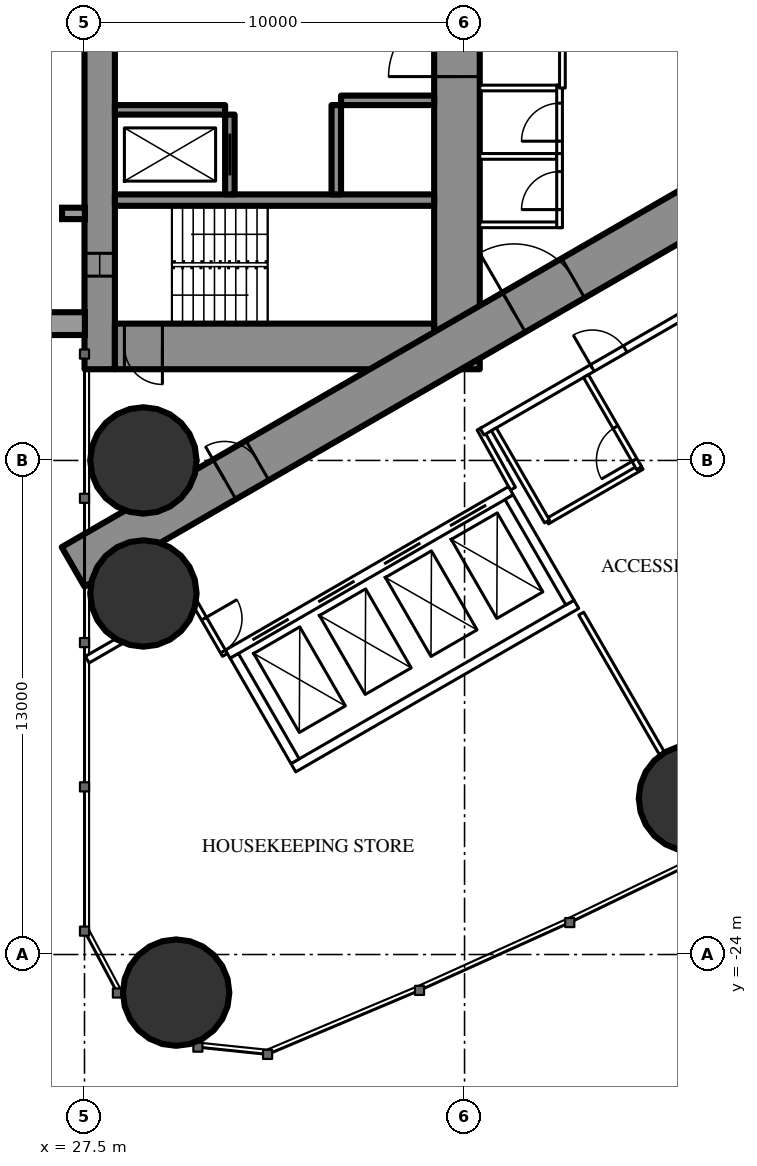
"""IFC4 building model, lengths in metres.
Left out: names, types, materials, properties, quantities, classifications, styles, units other than length and angle.
Written with IfcOpenShell. Run it as: python <this file> out.ifc"""

import sys

from ifc_helpers import new_model, si_unit, direction, frame, frame_2d, origin, origin_2d, place, context, subcontext, project, spatial, rectangle, hollow_circle, extrude, element, fill, save


model = new_model("IFC4")
c1 = context("Model", 3, precision=1e-05, world=origin(), true_north=direction((0.0, 1.0)))
c2 = subcontext(c1, "Body", "Model", "MODEL_VIEW")
j1 = project(units=[si_unit("LENGTHUNIT", "METRE"), si_unit("PLANEANGLEUNIT", "RADIAN")], contexts=[c1])
p1 = place(None, origin())
s1 = spatial("IfcSite", under=j1, at=p1, CompositionType="ELEMENT")
p2 = place(p1, origin())
s2 = spatial("IfcBuilding", under=s1, at=p2, CompositionType="ELEMENT")
p3 = place(p2, frame((0.0, 0.0, 21.5)))
s3 = spatial("IfcBuildingStorey", under=s2, at=p3, CompositionType="ELEMENT", Elevation=21.5)
for number, where, z_axis, x_axis in (
    (1, (29.911, -25.002, 0.0), (0.0, 0.0, 1.0), (1.0, 0.0, 0.0)),
    (2, (29.05, -11.0, 0.0), (0.0, 0.0, 1.0), (1.0, 0.0, 0.0)),
    (3, (29.05, -14.5, 0.0), (0.0, 0.0, 1.0), (1.0, 0.0, 0.0)),
    (4, (43.484, -19.886, 0.0), (0.0, 0.0, 1.0), (1.0, 0.0, 0.0)),
):
    element("IfcColumn", number, at=place(p3, frame(where, z_axis=z_axis, x_axis=x_axis)), inside=s3, PredefinedType="COLUMN", context=c2, shape_type="SweptSolid", body=[
        extrude(hollow_circle(Radius=1.4, WallThickness=0.12, at=origin_2d()), origin(), (0.0, 0.0, 1.0), 3.5),
    ])
p4 = place(p3, frame((27.9, -8.6, 0.0), z_axis=(0.0, 0.0, 1.0), x_axis=(0.0, 1.0, 0.0)))
e5 = element("IfcWall", 5, at=p4, inside=s3, PredefinedType="SHEAR", context=c2, shape_type="SweptSolid", body=[
    extrude(rectangle(XDim=17.2, YDim=0.8, at=frame_2d((8.6, 0.0))), origin(), (0.0, 0.0, 1.0), 3.5),
])
p5 = place(p4, frame((2.45, 0.0, 0.6)))
e6 = element("IfcOpeningElement", 6, at=p5, cuts=e5, PredefinedType="OPENING", context=c2, shape_type="SweptSolid", body=[
    extrude(rectangle(XDim=0.6, YDim=2.1, at=frame_2d((0.3, 1.05))), frame((0.0, 0.41, 0.0), z_axis=(0.0, -1.0, 0.0), x_axis=(1.0, 0.0, 0.0)), (0.0, 0.0, 1.0), 0.82),
])
p6 = place(p4, frame((14.15, 0.0, 0.6)))
e7 = element("IfcOpeningElement", 7, at=p6, cuts=e5, PredefinedType="OPENING", context=c2, shape_type="SweptSolid", body=[
    extrude(rectangle(XDim=0.6, YDim=2.1, at=frame_2d((0.3, 1.05))), frame((0.0, 0.41, 0.0), z_axis=(0.0, -1.0, 0.0), x_axis=(1.0, 0.0, 0.0)), (0.0, 0.0, 1.0), 0.82),
])
p7 = place(p3, frame((37.3, -8.6, 0.0), z_axis=(0.0, 0.0, 1.0), x_axis=(0.0, 1.0, 0.0)))
e8 = element("IfcWall", 8, at=p7, inside=s3, PredefinedType="SHEAR", context=c2, shape_type="SweptSolid", body=[
    extrude(rectangle(XDim=17.2, YDim=1.2, at=frame_2d((8.6, 0.0))), origin(), (0.0, 0.0, 1.0), 3.5),
])
p8 = place(p7, frame((7.7, 0.0, 0.0)))
e9 = element("IfcOpeningElement", 9, at=p8, cuts=e8, PredefinedType="OPENING", context=c2, shape_type="SweptSolid", body=[
    extrude(rectangle(XDim=1.8, YDim=2.2, at=frame_2d((0.9, 1.1))), frame((0.0, 0.61, 0.0), z_axis=(0.0, -1.0, 0.0), x_axis=(1.0, 0.0, 0.0)), (0.0, 0.0, 1.0), 1.22),
])
p9 = place(p3, frame((28.3, -8.0, 0.0), z_axis=(0.0, 0.0, 1.0), x_axis=(1.0, 0.0, 0.0)))
e10 = element("IfcWall", 10, at=p9, inside=s3, PredefinedType="SHEAR", context=c2, shape_type="SweptSolid", body=[
    extrude(rectangle(XDim=8.4, YDim=1.2, at=frame_2d((4.2, 0.0))), origin(), (0.0, 0.0, 1.0), 3.5),
])
p10 = place(p9, frame((0.25, 0.0, 0.0)))
e11 = element("IfcOpeningElement", 11, at=p10, cuts=e10, PredefinedType="OPENING", context=c2, shape_type="SweptSolid", body=[
    extrude(rectangle(XDim=1.0, YDim=2.2, at=frame_2d((0.5, 1.1))), frame((0.0, 0.61, 0.0), z_axis=(0.0, -1.0, 0.0), x_axis=(1.0, 0.0, 0.0)), (0.0, 0.0, 1.0), 1.22),
])
p11 = place(p3, frame((28.3, -4.15, 0.0), z_axis=(0.0, 0.0, 1.0), x_axis=(1.0, 0.0, 0.0)))
e12 = element("IfcWall", 12, at=p11, inside=s3, PredefinedType="SHEAR", context=c2, shape_type="SweptSolid", body=[
    extrude(rectangle(XDim=8.4, YDim=0.3, at=frame_2d((4.2, 0.0))), origin(), (0.0, 0.0, 1.0), 3.5),
])
p12 = place(p3, frame((31.325, -4.0, 0.0), z_axis=(0.0, 0.0, 1.0), x_axis=(0.0, 1.0, 0.0)))
e13 = element("IfcWall", 13, at=p12, inside=s3, PredefinedType="SHEAR", context=c2, shape_type="SweptSolid", body=[
    extrude(rectangle(XDim=2.1, YDim=0.25, at=frame_2d((1.05, 0.0))), origin(), (0.0, 0.0, 1.0), 3.5),
])
p13 = place(p12, frame((0.5, 0.0, 0.0)))
e14 = element("IfcOpeningElement", 14, at=p13, cuts=e13, PredefinedType="OPENING", context=c2, shape_type="SweptSolid", body=[
    extrude(rectangle(XDim=1.1, YDim=2.2, at=frame_2d((0.55, 1.1))), frame((0.0, 0.135, 0.0), z_axis=(0.0, -1.0, 0.0), x_axis=(1.0, 0.0, 0.0)), (0.0, 0.0, 1.0), 0.27),
])
p14 = place(p3, frame((34.125, -4.0, 0.0), z_axis=(0.0, 0.0, 1.0), x_axis=(0.0, 1.0, 0.0)))
e15 = element("IfcWall", 15, at=p14, inside=s3, PredefinedType="SHEAR", context=c2, shape_type="SweptSolid", body=[
    extrude(rectangle(XDim=2.35, YDim=0.25, at=frame_2d((1.175, 0.0))), origin(), (0.0, 0.0, 1.0), 3.5),
])
p15 = place(p3, frame((28.3, -1.775, 0.0), z_axis=(0.0, 0.0, 1.0), x_axis=(1.0, 0.0, 0.0)))
e16 = element("IfcWall", 16, at=p15, inside=s3, PredefinedType="SHEAR", context=c2, shape_type="SweptSolid", body=[
    extrude(rectangle(XDim=2.9, YDim=0.25, at=frame_2d((1.45, 0.0))), origin(), (0.0, 0.0, 1.0), 3.5),
])
p16 = place(p3, frame((34.25, -1.525, 0.0), z_axis=(0.0, 0.0, 1.0), x_axis=(1.0, 0.0, 0.0)))
e17 = element("IfcWall", 17, at=p16, inside=s3, PredefinedType="SHEAR", context=c2, shape_type="SweptSolid", body=[
    extrude(rectangle(XDim=2.45, YDim=0.25, at=frame_2d((1.225, 0.0))), origin(), (0.0, 0.0, 1.0), 3.5),
])
p17 = place(p3, frame((27.2, -13.8, 0.0), z_axis=(0.0, 0.0, 1.0), x_axis=(0.866027159892, 0.499996958321, 0.0)))
e18 = element("IfcWall", 18, at=p17, inside=s3, PredefinedType="SHEAR", context=c2, shape_type="SweptSolid", body=[
    extrude(rectangle(XDim=27.947, YDim=1.2, at=frame_2d((13.973, 0.0))), origin(), (0.0, 0.0, 1.0), 3.5),
])
p18 = place(p17, frame((4.6, 0.0, 0.0)))
e19 = element("IfcOpeningElement", 19, at=p18, cuts=e18, PredefinedType="OPENING", context=c2, shape_type="SweptSolid", body=[
    extrude(rectangle(XDim=1.0, YDim=2.2, at=frame_2d((0.5, 1.1))), frame((0.0, 0.61, 0.0), z_axis=(0.0, -1.0, 0.0), x_axis=(1.0, 0.0, 0.0)), (0.0, 0.0, 1.0), 1.22),
])
p19 = place(p17, frame((13.395, 0.0, 0.0)))
e20 = element("IfcOpeningElement", 20, at=p19, cuts=e18, PredefinedType="OPENING", context=c2, shape_type="SweptSolid", body=[
    extrude(rectangle(XDim=1.8, YDim=2.2, at=frame_2d((0.9, 1.1))), frame((0.0, 0.61, 0.0), z_axis=(0.0, -1.0, 0.0), x_axis=(1.0, 0.0, 0.0)), (0.0, 0.0, 1.0), 1.22),
])
p20 = place(p3, frame((40.57, -15.03, 0.0), z_axis=(0.0, 0.0, 1.0), x_axis=(0.500012993597, -0.866017901798, 0.0)))
e21 = element("IfcWall", 21, at=p20, inside=s3, PredefinedType="PARTITIONING", context=c2, shape_type="SweptSolid", body=[
    extrude(rectangle(XDim=4.243, YDim=0.15, at=frame_2d((2.122, 0.0))), origin(), (0.0, 0.0, 1.0), 3.25),
])
p21 = place(p3, frame((27.572, -16.241, 0.0), z_axis=(0.0, 0.0, 1.0), x_axis=(0.866029654818, 0.499992636921, 0.0)))
e22 = element("IfcWall", 22, at=p21, inside=s3, PredefinedType="PARTITIONING", context=c2, shape_type="SweptSolid", body=[
    extrude(rectangle(XDim=3.155, YDim=0.2, at=frame_2d((1.577, 0.0))), origin(), (0.0, 0.0, 1.0), 3.25),
])
p22 = place(p3, frame((38.773, -11.742, 0.0), z_axis=(0.0, 0.0, 1.0), x_axis=(-0.485528096672, 0.8742210632, 0.0)))
e23 = element("IfcWall", 23, at=p22, inside=s3, PredefinedType="PARTITIONING", context=c2, shape_type="SweptSolid", body=[
    extrude(rectangle(XDim=1.805, YDim=0.15, at=frame_2d((0.903, 0.0))), origin(), (0.0, 0.0, 1.0), 3.25),
])
p23 = place(p3, frame((30.293, -14.554, 0.0), z_axis=(0.0, 0.0, 1.0), x_axis=(0.499980071345, -0.866036909293, 0.0)))
e24 = element("IfcWall", 24, at=p23, inside=s3, PredefinedType="PARTITIONING", context=c2, shape_type="SweptSolid", body=[
    extrude(rectangle(XDim=1.805, YDim=0.15, at=frame_2d((0.902, 0.0))), origin(), (0.0, 0.0, 1.0), 3.25),
])
p24 = place(p23, frame((0.702, 0.0, 0.0)))
e25 = element("IfcOpeningElement", 25, at=p24, cuts=e24, PredefinedType="OPENING", context=c2, shape_type="SweptSolid", body=[
    extrude(rectangle(XDim=1.0, YDim=2.2, at=frame_2d((0.5, 1.1))), frame((0.0, 0.085, 0.0), z_axis=(0.0, -1.0, 0.0), x_axis=(1.0, 0.0, 0.0)), (0.0, 0.0, 1.0), 0.17),
])
p25 = place(p3, frame((37.96, -10.243, 0.0), z_axis=(0.0, 0.0, 1.0), x_axis=(0.866024617314, 0.500001362204, 0.0)))
e26 = element("IfcWall", 26, at=p25, inside=s3, PredefinedType="PARTITIONING", context=c2, shape_type="SweptSolid", body=[
    extrude(rectangle(XDim=8.512, YDim=0.2, at=frame_2d((4.256, 0.0))), origin(), (0.0, 0.0, 1.0), 3.25),
])
p26 = place(p25, frame((3.35, 0.0, 0.0)))
e27 = element("IfcOpeningElement", 27, at=p26, cuts=e26, PredefinedType="OPENING", context=c2, shape_type="SweptSolid", body=[
    extrude(rectangle(XDim=1.0, YDim=2.2, at=frame_2d((0.5, 1.1))), frame((0.0, 0.11, 0.0), z_axis=(0.0, -1.0, 0.0), x_axis=(1.0, 0.0, 0.0)), (0.0, 0.0, 1.0), 0.22),
])
p27 = place(p3, frame((39.67, -12.605, 0.0), z_axis=(0.0, 0.0, 1.0), x_axis=(0.866018712932, 0.500011588718, 0.0)))
e28 = element("IfcWall", 28, at=p27, inside=s3, PredefinedType="PARTITIONING", context=c2, shape_type="SweptSolid", body=[
    extrude(rectangle(XDim=2.875, YDim=0.15, at=frame_2d((1.438, 0.0))), origin(), (0.0, 0.0, 1.0), 3.25),
])
p28 = place(p3, frame((40.695, -8.78, 0.0), z_axis=(0.0, 0.0, 1.0), x_axis=(0.500049511043, -0.865996816683, 0.0)))
e29 = element("IfcWall", 29, at=p28, inside=s3, PredefinedType="PARTITIONING", context=c2, shape_type="SweptSolid", body=[
    extrude(rectangle(XDim=2.8, YDim=0.15, at=frame_2d((1.4, 0.0))), origin(), (0.0, 0.0, 1.0), 3.25),
])
p29 = place(p28, frame((1.55, 0.0, 0.0)))
e30 = element("IfcOpeningElement", 30, at=p29, cuts=e29, PredefinedType="OPENING", context=c2, shape_type="SweptSolid", body=[
    extrude(rectangle(XDim=1.0, YDim=2.2, at=frame_2d((0.5, 1.1))), frame((0.0, 0.085, 0.0), z_axis=(0.0, -1.0, 0.0), x_axis=(1.0, 0.0, 0.0)), (0.0, 0.0, 1.0), 0.17),
])
p30 = place(p3, frame((38.27, -10.18, 0.0), z_axis=(0.0, 0.0, 1.0), x_axis=(0.500049511043, -0.865996816683, 0.0)))
e31 = element("IfcWall", 31, at=p30, inside=s3, PredefinedType="PARTITIONING", context=c2, shape_type="SweptSolid", body=[
    extrude(rectangle(XDim=2.8, YDim=0.15, at=frame_2d((1.4, 0.0))), origin(), (0.0, 0.0, 1.0), 3.25),
])
for number, where, z_axis, x_axis in (
    (32, (37.9, -1.2, 0.0), (0.0, 0.0, 1.0), (1.0, 0.0, 0.0)),
    (33, (37.9, -3.0, 0.0), (0.0, 0.0, 1.0), (1.0, 0.0, 0.0)),
    (34, (37.9, -4.8, 0.0), (0.0, 0.0, 1.0), (1.0, 0.0, 0.0)),
):
    element("IfcWall", number, at=place(p3, frame(where, z_axis=z_axis, x_axis=x_axis)), inside=s3, PredefinedType="PARTITIONING", context=c2, shape_type="SweptSolid", body=[
        extrude(rectangle(XDim=2.175, YDim=0.15, at=frame_2d((1.087, 0.0))), origin(), (0.0, 0.0, 1.0), 3.25),
    ])
p31 = place(p3, frame((40.0, -3.075, 0.0), z_axis=(0.0, 0.0, 1.0), x_axis=(0.0, 1.0, 0.0)))
e35 = element("IfcWall", 35, at=p31, inside=s3, PredefinedType="PARTITIONING", context=c2, shape_type="SweptSolid", body=[
    extrude(rectangle(XDim=1.95, YDim=0.15, at=frame_2d((0.975, 0.0))), origin(), (0.0, 0.0, 1.0), 3.25),
])
p32 = place(p31, frame((0.475, 0.0, 0.0)))
e36 = element("IfcOpeningElement", 36, at=p32, cuts=e35, PredefinedType="OPENING", context=c2, shape_type="SweptSolid", body=[
    extrude(rectangle(XDim=1.0, YDim=2.2, at=frame_2d((0.5, 1.1))), frame((0.0, 0.085, 0.0), z_axis=(0.0, -1.0, 0.0), x_axis=(1.0, 0.0, 0.0)), (0.0, 0.0, 1.0), 0.17),
])
p33 = place(p3, frame((40.0, -4.875, 0.0), z_axis=(0.0, 0.0, 1.0), x_axis=(0.0, 1.0, 0.0)))
e37 = element("IfcWall", 37, at=p33, inside=s3, PredefinedType="PARTITIONING", context=c2, shape_type="SweptSolid", body=[
    extrude(rectangle(XDim=1.95, YDim=0.15, at=frame_2d((0.975, 0.0))), origin(), (0.0, 0.0, 1.0), 3.25),
])
p34 = place(p33, frame((0.475, 0.0, 0.0)))
e38 = element("IfcOpeningElement", 38, at=p34, cuts=e37, PredefinedType="OPENING", context=c2, shape_type="SweptSolid", body=[
    extrude(rectangle(XDim=1.0, YDim=2.2, at=frame_2d((0.5, 1.1))), frame((0.0, 0.085, 0.0), z_axis=(0.0, -1.0, 0.0), x_axis=(1.0, 0.0, 0.0)), (0.0, 0.0, 1.0), 0.17),
])
p35 = place(p3, frame((40.075, -1.2, 0.0), z_axis=(0.0, 0.0, 1.0), x_axis=(0.0, 1.0, 0.0)))
e39 = element("IfcWall", 39, at=p35, inside=s3, PredefinedType="PARTITIONING", context=c2, shape_type="SweptSolid", body=[
    extrude(rectangle(XDim=6.874, YDim=0.15, at=frame_2d((3.437, 0.0))), origin(), (0.0, 0.0, 1.0), 3.25),
])
p36 = place(p35, frame((2.537, 0.0, 0.0)))
e40 = element("IfcOpeningElement", 40, at=p36, cuts=e39, PredefinedType="OPENING", context=c2, shape_type="SweptSolid", body=[
    extrude(rectangle(XDim=1.8, YDim=2.2, at=frame_2d((0.9, 1.1))), frame((0.0, 0.085, 0.0), z_axis=(0.0, -1.0, 0.0), x_axis=(1.0, 0.0, 0.0)), (0.0, 0.0, 1.0), 0.17),
])
p37 = place(p3, frame((31.271, -16.097, 0.0), z_axis=(0.0, 0.0, 1.0), x_axis=(0.86604045752, 0.499973925258, 0.0)))
e41 = element("IfcWall", 41, at=p37, inside=s3, PredefinedType="PARTITIONING", context=c2, shape_type="SweptSolid", body=[
    extrude(rectangle(XDim=8.6, YDim=0.25, at=frame_2d((4.3, 0.0))), origin(), (0.0, 0.0, 1.0), 3.25),
])
p38 = place(p37, frame((0.75, 0.0, 0.0)))
e42 = element("IfcOpeningElement", 42, at=p38, cuts=e41, PredefinedType="OPENING", context=c2, shape_type="SweptSolid", body=[
    extrude(rectangle(XDim=1.1, YDim=2.2, at=frame_2d((0.55, 1.1))), frame((0.0, 0.135, 0.0), z_axis=(0.0, -1.0, 0.0), x_axis=(1.0, 0.0, 0.0)), (0.0, 0.0, 1.0), 0.27),
])
p39 = place(p37, frame((2.75, 0.0, 0.0)))
e43 = element("IfcOpeningElement", 43, at=p39, cuts=e41, PredefinedType="OPENING", context=c2, shape_type="SweptSolid", body=[
    extrude(rectangle(XDim=1.1, YDim=2.2, at=frame_2d((0.55, 1.1))), frame((0.0, 0.135, 0.0), z_axis=(0.0, -1.0, 0.0), x_axis=(1.0, 0.0, 0.0)), (0.0, 0.0, 1.0), 0.27),
])
p40 = place(p37, frame((4.75, 0.0, 0.0)))
e44 = element("IfcOpeningElement", 44, at=p40, cuts=e41, PredefinedType="OPENING", context=c2, shape_type="SweptSolid", body=[
    extrude(rectangle(XDim=1.1, YDim=2.2, at=frame_2d((0.55, 1.1))), frame((0.0, 0.135, 0.0), z_axis=(0.0, -1.0, 0.0), x_axis=(1.0, 0.0, 0.0)), (0.0, 0.0, 1.0), 0.27),
])
p41 = place(p37, frame((6.75, 0.0, 0.0)))
e45 = element("IfcOpeningElement", 45, at=p41, cuts=e41, PredefinedType="OPENING", context=c2, shape_type="SweptSolid", body=[
    extrude(rectangle(XDim=1.1, YDim=2.2, at=frame_2d((0.55, 1.1))), frame((0.0, 0.135, 0.0), z_axis=(0.0, -1.0, 0.0), x_axis=(1.0, 0.0, 0.0)), (0.0, 0.0, 1.0), 0.27),
])
p42 = place(p3, frame((32.996, -19.086, 0.0), z_axis=(0.0, 0.0, 1.0), x_axis=(0.866028165386, 0.499995216735, 0.0)))
e46 = element("IfcWall", 46, at=p42, inside=s3, PredefinedType="PARTITIONING", context=c2, shape_type="SweptSolid", body=[
    extrude(rectangle(XDim=8.6, YDim=0.25, at=frame_2d((4.3, 0.0))), origin(), (0.0, 0.0, 1.0), 3.25),
])
for number, where, z_axis, x_axis in (
    (47, (31.441, -16.143, 0.0), (0.0, 0.0, 1.0), (0.5, -0.866, 0.0)),
    (48, (38.673, -11.968, 0.0), (0.0, 0.0, 1.0), (0.5, -0.866, 0.0)),
):
    element("IfcWall", number, at=place(p3, frame(where, z_axis=z_axis, x_axis=x_axis)), inside=s3, PredefinedType="PARTITIONING", context=c2, shape_type="SweptSolid", body=[
        extrude(rectangle(XDim=3.201, YDim=0.25, at=frame_2d((1.6, 0.0))), origin(), (0.0, 0.0, 1.0), 3.25),
    ])
p43 = place(p29, origin())
e49 = element("IfcDoor", 49, at=p43, inside=s3, OperationType="SINGLE_SWING_RIGHT", PredefinedType="DOOR", context=c2, shape_type="SweptSolid", body=[
    extrude(rectangle(XDim=1.0, YDim=2.2, at=frame_2d((0.5, 1.1))), frame((0.0, 0.025, 0.0), z_axis=(0.0, -1.0, 0.0), x_axis=(1.0, 0.0, 0.0)), (0.0, 0.0, 1.0), 0.05),
])
fill(e30, e49)
p44 = place(p26, origin())
e50 = element("IfcDoor", 50, at=p44, inside=s3, OperationType="SINGLE_SWING_LEFT", PredefinedType="DOOR", context=c2, shape_type="SweptSolid", body=[
    extrude(rectangle(XDim=1.0, YDim=2.2, at=frame_2d((0.5, 1.1))), frame((0.0, 0.025, 0.0), z_axis=(0.0, -1.0, 0.0), x_axis=(1.0, 0.0, 0.0)), (0.0, 0.0, 1.0), 0.05),
])
fill(e27, e50)
p45 = place(p24, origin())
e51 = element("IfcDoor", 51, at=p45, inside=s3, OperationType="SINGLE_SWING_LEFT", PredefinedType="DOOR", context=c2, shape_type="SweptSolid", body=[
    extrude(rectangle(XDim=1.0, YDim=2.2, at=frame_2d((0.5, 1.1))), frame((0.0, 0.025, 0.0), z_axis=(0.0, -1.0, 0.0), x_axis=(1.0, 0.0, 0.0)), (0.0, 0.0, 1.0), 0.05),
])
fill(e25, e51)
p46 = place(p32, origin())
e52 = element("IfcDoor", 52, at=p46, inside=s3, OperationType="SINGLE_SWING_LEFT", PredefinedType="DOOR", context=c2, shape_type="SweptSolid", body=[
    extrude(rectangle(XDim=1.0, YDim=2.2, at=frame_2d((0.5, 1.1))), frame((0.0, 0.025, 0.0), z_axis=(0.0, -1.0, 0.0), x_axis=(1.0, 0.0, 0.0)), (0.0, 0.0, 1.0), 0.05),
])
fill(e36, e52)
p47 = place(p34, origin())
e53 = element("IfcDoor", 53, at=p47, inside=s3, OperationType="SINGLE_SWING_LEFT", PredefinedType="DOOR", context=c2, shape_type="SweptSolid", body=[
    extrude(rectangle(XDim=1.0, YDim=2.2, at=frame_2d((0.5, 1.1))), frame((0.0, 0.025, 0.0), z_axis=(0.0, -1.0, 0.0), x_axis=(1.0, 0.0, 0.0)), (0.0, 0.0, 1.0), 0.05),
])
fill(e38, e53)
p48 = place(p18, origin())
e54 = element("IfcDoor", 54, at=p48, inside=s3, OperationType="SINGLE_SWING_LEFT", PredefinedType="DOOR", context=c2, shape_type="SweptSolid", body=[
    extrude(rectangle(XDim=1.0, YDim=2.2, at=frame_2d((0.5, 1.1))), frame((0.0, 0.025, 0.0), z_axis=(0.0, -1.0, 0.0), x_axis=(1.0, 0.0, 0.0)), (0.0, 0.0, 1.0), 0.05),
])
fill(e19, e54)
p49 = place(p19, origin())
e55 = element("IfcDoor", 55, at=p49, inside=s3, OperationType="DOUBLE_DOOR_SINGLE_SWING", PredefinedType="DOOR", context=c2, shape_type="SweptSolid", body=[
    extrude(rectangle(XDim=1.8, YDim=2.2, at=frame_2d((0.9, 1.1))), frame((0.0, 0.025, 0.0), z_axis=(0.0, -1.0, 0.0), x_axis=(1.0, 0.0, 0.0)), (0.0, 0.0, 1.0), 0.05),
])
fill(e20, e55)
p50 = place(p8, origin())
e56 = element("IfcDoor", 56, at=p50, inside=s3, OperationType="DOUBLE_DOOR_SINGLE_SWING", PredefinedType="DOOR", context=c2, shape_type="SweptSolid", body=[
    extrude(rectangle(XDim=1.8, YDim=2.2, at=frame_2d((0.9, 1.1))), frame((0.0, 0.025, 0.0), z_axis=(0.0, -1.0, 0.0), x_axis=(1.0, 0.0, 0.0)), (0.0, 0.0, 1.0), 0.05),
])
fill(e9, e56)
p51 = place(p10, origin())
e57 = element("IfcDoor", 57, at=p51, inside=s3, OperationType="SINGLE_SWING_RIGHT", PredefinedType="DOOR", context=c2, shape_type="SweptSolid", body=[
    extrude(rectangle(XDim=1.0, YDim=2.2, at=frame_2d((0.5, 1.1))), frame((0.0, 0.025, 0.0), z_axis=(0.0, -1.0, 0.0), x_axis=(1.0, 0.0, 0.0)), (0.0, 0.0, 1.0), 0.05),
])
fill(e11, e57)
p52 = place(p13, origin())
e58 = element("IfcDoor", 58, at=p52, inside=s3, OperationType="SLIDING_TO_LEFT", PredefinedType="USERDEFINED", context=c2, shape_type="SweptSolid", body=[
    extrude(rectangle(XDim=1.1, YDim=2.2, at=frame_2d((0.55, 1.1))), frame((0.0, 0.025, 0.0), z_axis=(0.0, -1.0, 0.0), x_axis=(1.0, 0.0, 0.0)), (0.0, 0.0, 1.0), 0.05),
])
fill(e14, e58)
p53 = place(p38, origin())
e59 = element("IfcDoor", 59, at=p53, inside=s3, OperationType="DOUBLE_DOOR_SLIDING", PredefinedType="USERDEFINED", context=c2, shape_type="SweptSolid", body=[
    extrude(rectangle(XDim=1.1, YDim=2.2, at=frame_2d((0.55, 1.1))), frame((0.0, 0.025, 0.0), z_axis=(0.0, -1.0, 0.0), x_axis=(1.0, 0.0, 0.0)), (0.0, 0.0, 1.0), 0.05),
])
fill(e42, e59)
p54 = place(p39, origin())
e60 = element("IfcDoor", 60, at=p54, inside=s3, OperationType="DOUBLE_DOOR_SLIDING", PredefinedType="USERDEFINED", context=c2, shape_type="SweptSolid", body=[
    extrude(rectangle(XDim=1.1, YDim=2.2, at=frame_2d((0.55, 1.1))), frame((0.0, 0.025, 0.0), z_axis=(0.0, -1.0, 0.0), x_axis=(1.0, 0.0, 0.0)), (0.0, 0.0, 1.0), 0.05),
])
fill(e43, e60)
p55 = place(p40, origin())
e61 = element("IfcDoor", 61, at=p55, inside=s3, OperationType="DOUBLE_DOOR_SLIDING", PredefinedType="USERDEFINED", context=c2, shape_type="SweptSolid", body=[
    extrude(rectangle(XDim=1.1, YDim=2.2, at=frame_2d((0.55, 1.1))), frame((0.0, 0.025, 0.0), z_axis=(0.0, -1.0, 0.0), x_axis=(1.0, 0.0, 0.0)), (0.0, 0.0, 1.0), 0.05),
])
fill(e44, e61)
p56 = place(p41, origin())
e62 = element("IfcDoor", 62, at=p56, inside=s3, OperationType="DOUBLE_DOOR_SLIDING", PredefinedType="USERDEFINED", context=c2, shape_type="SweptSolid", body=[
    extrude(rectangle(XDim=1.1, YDim=2.2, at=frame_2d((0.55, 1.1))), frame((0.0, 0.025, 0.0), z_axis=(0.0, -1.0, 0.0), x_axis=(1.0, 0.0, 0.0)), (0.0, 0.0, 1.0), 0.05),
])
fill(e45, e62)
p57 = place(p5, origin())
e63 = element("IfcWindow", 63, at=p57, inside=s3, PartitioningType="SINGLE_PANEL", PredefinedType="WINDOW", context=c2, shape_type="SweptSolid", body=[
    extrude(rectangle(XDim=0.6, YDim=2.1, at=frame_2d((0.3, 1.05))), frame((0.0, 0.03, 0.0), z_axis=(0.0, -1.0, 0.0), x_axis=(1.0, 0.0, 0.0)), (0.0, 0.0, 1.0), 0.06),
])
fill(e6, e63)
save(model, sys.argv[1])
